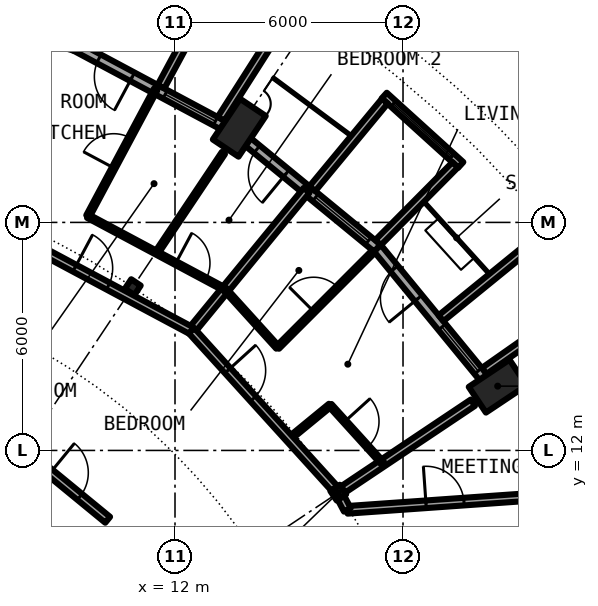
"""IFC4 building model, lengths in metres.
Left out: names, types, materials, properties, quantities, classifications, styles, units other than length and angle.
Written with IfcOpenShell. Run it as: python <this file> out.ifc"""

import sys

from ifc_helpers import new_model, si_unit, direction, frame, frame_2d, origin, origin_2d, place, context, subcontext, project, spatial, rectangle, circle, hollow_circle, i_section, extrude, element, fill, save


model = new_model("IFC4")
c1 = context("Model", 3, precision=1e-05, world=origin(), true_north=direction((0.0, 1.0)))
c2 = subcontext(c1, "Body", "Model", "MODEL_VIEW")
j1 = project(units=[si_unit("LENGTHUNIT", "METRE"), si_unit("PLANEANGLEUNIT", "RADIAN")], contexts=[c1])
p1 = place(None, origin())
s1 = spatial("IfcSite", under=j1, at=p1, CompositionType="ELEMENT")
p2 = place(p1, origin())
s2 = spatial("IfcBuilding", under=s1, at=p2, CompositionType="ELEMENT")
p3 = place(p2, frame((0.0, 0.0, 243.2)))
s3 = spatial("IfcBuildingStorey", under=s2, at=p3, CompositionType="ELEMENT", Elevation=243.2)
for number, where, z_axis, x_axis in (
    (1, (21.027, 14.05, 0.242), (-0.347, -0.232, 0.909), (0.556, -0.831, 0.0)),
    (2, (14.05, 21.027, 0.242), (-0.232, -0.347, 0.909), (0.831, -0.556, 0.0)),
):
    element("IfcColumn", number, at=place(p3, frame(where, z_axis=z_axis, x_axis=x_axis)), inside=s3, PredefinedType="COLUMN", context=c2, shape_type="SweptSolid", body=[
        extrude(hollow_circle(Radius=0.406, WallThickness=0.03, at=origin_2d()), origin(), (0.0, 0.0, 1.0), 3.09),
    ])
for number, where, z_axis, x_axis in (
    (3, (16.297, 10.889, 0.0), (0.0, 0.0, 1.0), (0.831, 0.556, 0.0)),
    (4, (10.889, 16.297, 0.0), (0.0, 0.0, 1.0), (0.556, 0.831, 0.0)),
):
    element("IfcColumn", number, at=place(p3, frame(where, z_axis=z_axis, x_axis=x_axis)), inside=s3, PredefinedType="COLUMN", context=c2, shape_type="SweptSolid", body=[
        extrude(i_section(OverallWidth=0.3, OverallDepth=0.3, WebThickness=0.011, FlangeThickness=0.019, FilletRadius=0.027, at=origin_2d()), origin(), (0.0, 0.0, 1.0), 3.05),
    ])
p4 = place(p3, frame((20.371, 13.611, 0.0), z_axis=(0.0, 0.0, 1.0), x_axis=(-0.634396836208, 0.773007538262, 0.0)))
e5 = element("IfcWall", 5, at=p4, inside=s3, PredefinedType="SOLIDWALL", context=c2, shape_type="SweptSolid", body=[
    extrude(rectangle(XDim=4.803, YDim=0.25, at=frame_2d((2.402, 0.0))), origin(), (0.0, 0.0, 1.0), 2.7),
])
p5 = place(p4, frame((0.62, 0.0, 0.3)))
e6 = element("IfcOpeningElement", 6, at=p5, cuts=e5, PredefinedType="OPENING", context=c2, shape_type="SweptSolid", body=[
    extrude(rectangle(XDim=1.5, YDim=2.1, at=frame_2d((0.75, 1.05))), frame((0.0, 0.135, 0.0), z_axis=(0.0, -1.0, 0.0), x_axis=(1.0, 0.0, 0.0)), (0.0, 0.0, 1.0), 0.27),
])
p6 = place(p4, frame((3.099, 0.0, 0.0)))
e7 = element("IfcOpeningElement", 7, at=p6, cuts=e5, PredefinedType="OPENING", context=c2, shape_type="SweptSolid", body=[
    extrude(rectangle(XDim=1.0, YDim=2.2, at=frame_2d((0.5, 1.1))), frame((0.0, 0.135, 0.0), z_axis=(0.0, -1.0, 0.0), x_axis=(1.0, 0.0, 0.0)), (0.0, 0.0, 1.0), 0.27),
])
p7 = place(p3, frame((20.138, 14.093, -0.03), z_axis=(0.0, 0.0, 1.0), x_axis=(0.81913764619, 0.573596998419, 0.0)))
e8 = element("IfcWall", 8, at=p7, inside=s3, PredefinedType="SOLIDWALL", context=c2, shape_type="SweptSolid", body=[
    extrude(rectangle(XDim=2.92, YDim=0.2, at=frame_2d((1.46, 0.0))), origin(), (0.0, 0.0, 1.0), 2.73),
])
p8 = place(p3, frame((19.0, 15.479, -0.03), z_axis=(0.0, 0.0, 1.0), x_axis=(0.775612161439, 0.631209771017, 0.0)))
e9 = element("IfcWall", 9, at=p8, inside=s3, PredefinedType="SOLIDWALL", context=c2, shape_type="SweptSolid", body=[
    extrude(rectangle(XDim=2.992, YDim=0.2, at=frame_2d((1.496, 0.0))), origin(), (0.0, 0.0, 1.0), 2.73),
])
p9 = place(p3, frame((17.324, 17.324, 0.0), z_axis=(0.0, 0.0, 1.0), x_axis=(-0.773007538262, 0.634396836208, 0.0)))
e10 = element("IfcWall", 10, at=p9, inside=s3, PredefinedType="SOLIDWALL", context=c2, shape_type="SweptSolid", body=[
    extrude(rectangle(XDim=4.803, YDim=0.25, at=frame_2d((2.402, 0.0))), origin(), (0.0, 0.0, 1.0), 2.7),
])
p10 = place(p9, frame((0.304, 0.0, 0.3)))
e11 = element("IfcOpeningElement", 11, at=p10, cuts=e10, PredefinedType="OPENING", context=c2, shape_type="SweptSolid", body=[
    extrude(rectangle(XDim=1.8, YDim=2.1, at=frame_2d((0.9, 1.05))), frame((0.0, 0.135, 0.0), z_axis=(0.0, -1.0, 0.0), x_axis=(1.0, 0.0, 0.0)), (0.0, 0.0, 1.0), 0.27),
])
p11 = place(p9, frame((3.099, 0.0, 0.0)))
e12 = element("IfcOpeningElement", 12, at=p11, cuts=e10, PredefinedType="OPENING", context=c2, shape_type="SweptSolid", body=[
    extrude(rectangle(XDim=1.0, YDim=2.2, at=frame_2d((0.5, 1.1))), frame((0.0, 0.135, 0.0), z_axis=(0.0, -1.0, 0.0), x_axis=(1.0, 0.0, 0.0)), (0.0, 0.0, 1.0), 0.27),
])
p12 = place(p3, frame((19.52, 19.513, -0.03), z_axis=(0.0, 0.0, 1.0), x_axis=(-0.741016284298, 0.671487056022, 0.0)))
e13 = element("IfcWall", 13, at=p12, inside=s3, PredefinedType="SOLIDWALL", context=c2, shape_type="SweptSolid", body=[
    extrude(rectangle(XDim=2.718, YDim=0.2, at=frame_2d((1.359, 0.0))), origin(), (0.0, 0.0, 1.0), 2.73),
])
p13 = place(p12, frame((0.319, 0.0, 0.33)))
e14 = element("IfcOpeningElement", 14, at=p13, cuts=e13, PredefinedType="OPENING", context=c2, shape_type="SweptSolid", body=[
    extrude(circle(Radius=1.04, at=frame_2d((1.04, 1.04))), frame((0.0, 0.11, 0.0), z_axis=(0.0, -1.0, 0.0), x_axis=(1.0, 0.0, 0.0)), (0.0, 0.0, 1.0), 0.22),
])
p14 = place(p3, frame((17.344, 17.47, -0.03), z_axis=(0.0, 0.0, 1.0), x_axis=(0.704306055012, 0.709896457854, 0.0)))
e15 = element("IfcWall", 15, at=p14, inside=s3, PredefinedType="SOLIDWALL", context=c2, shape_type="SweptSolid", body=[
    extrude(rectangle(XDim=2.882, YDim=0.2, at=frame_2d((1.441, 0.0))), origin(), (0.0, 0.0, 1.0), 2.73),
])
p15 = place(p3, frame((15.615, 18.888, -0.03), z_axis=(0.0, 0.0, 1.0), x_axis=(0.637452521862, 0.770489638069, 0.0)))
e16 = element("IfcWall", 16, at=p15, inside=s3, PredefinedType="SOLIDWALL", context=c2, shape_type="SweptSolid", body=[
    extrude(rectangle(XDim=2.993, YDim=0.2, at=frame_2d((1.497, 0.0))), origin(), (0.0, 0.0, 1.0), 2.73),
])
p16 = place(p3, frame((13.611, 20.371, 0.0), z_axis=(0.0, 0.0, 1.0), x_axis=(-0.881903608701, 0.471429766731, 0.0)))
e17 = element("IfcWall", 17, at=p16, inside=s3, PredefinedType="SOLIDWALL", context=c2, shape_type="SweptSolid", body=[
    extrude(rectangle(XDim=4.802, YDim=0.25, at=frame_2d((2.401, 0.0))), origin(), (0.0, 0.0, 1.0), 2.7),
])
p17 = place(p16, frame((0.62, 0.0, 0.3)))
e18 = element("IfcOpeningElement", 18, at=p17, cuts=e17, PredefinedType="OPENING", context=c2, shape_type="SweptSolid", body=[
    extrude(rectangle(XDim=1.5, YDim=2.1, at=frame_2d((0.75, 1.05))), frame((0.0, 0.135, 0.0), z_axis=(0.0, -1.0, 0.0), x_axis=(1.0, 0.0, 0.0)), (0.0, 0.0, 1.0), 0.27),
])
p18 = place(p16, frame((3.099, 0.0, 0.0)))
e19 = element("IfcOpeningElement", 19, at=p18, cuts=e17, PredefinedType="OPENING", context=c2, shape_type="SweptSolid", body=[
    extrude(rectangle(XDim=1.0, YDim=2.2, at=frame_2d((0.5, 1.1))), frame((0.0, 0.135, 0.0), z_axis=(0.0, -1.0, 0.0), x_axis=(1.0, 0.0, 0.0)), (0.0, 0.0, 1.0), 0.27),
])
p19 = place(p3, frame((13.211, 20.727, -0.03), z_axis=(0.0, 0.0, 1.0), x_axis=(0.537551395407, 0.843230986917, 0.0)))
e20 = element("IfcWall", 20, at=p19, inside=s3, PredefinedType="SOLIDWALL", context=c2, shape_type="SweptSolid", body=[
    extrude(rectangle(XDim=2.921, YDim=0.2, at=frame_2d((1.46, 0.0))), origin(), (0.0, 0.0, 1.0), 2.73),
])
p20 = place(p3, frame((11.631, 21.572, -0.03), z_axis=(0.0, 0.0, 1.0), x_axis=(0.474649669009, 0.880174807473, 0.0)))
e21 = element("IfcWall", 21, at=p20, inside=s3, PredefinedType="SOLIDWALL", context=c2, shape_type="SweptSolid", body=[
    extrude(rectangle(XDim=2.991, YDim=0.2, at=frame_2d((1.496, 0.0))), origin(), (0.0, 0.0, 1.0), 2.73),
])
p21 = place(p3, frame((9.709, 18.165, 0.0), z_axis=(0.0, 0.0, 1.0), x_axis=(0.471396335579, 0.881921478819, 0.0)))
e22 = element("IfcWall", 22, at=p21, inside=s3, PredefinedType="PARTITIONING", context=c2, shape_type="SweptSolid", body=[
    extrude(rectangle(XDim=3.778, YDim=0.1, at=frame_2d((1.889, 0.0))), origin(), (0.0, 0.0, 1.0), 2.7),
])
p22 = place(p21, frame((1.439, 0.0, 0.0)))
e23 = element("IfcOpeningElement", 23, at=p22, cuts=e22, PredefinedType="OPENING", context=c2, shape_type="SweptSolid", body=[
    extrude(rectangle(XDim=0.9, YDim=2.3, at=frame_2d((0.45, 1.15))), frame((0.0, 0.06, 0.0), z_axis=(0.0, -1.0, 0.0), x_axis=(1.0, 0.0, 0.0)), (0.0, 0.0, 1.0), 0.12),
])
p23 = place(p3, frame((11.516, 17.199, 0.0), z_axis=(0.0, 0.0, 1.0), x_axis=(0.556125344044, 0.831098430821, 0.0)))
e24 = element("IfcWall", 24, at=p23, inside=s3, PredefinedType="PARTITIONING", context=c2, shape_type="SweptSolid", body=[
    extrude(rectangle(XDim=3.161, YDim=0.1, at=frame_2d((1.581, 0.0))), origin(), (0.0, 0.0, 1.0), 2.7),
])
p24 = place(p3, frame((12.433, 15.152, 0.0), z_axis=(0.0, 0.0, 1.0), x_axis=(0.634362058107, 0.77303607887, 0.0)))
e25 = element("IfcWall", 25, at=p24, inside=s3, PredefinedType="PARTITIONING", context=c2, shape_type="SweptSolid", body=[
    extrude(rectangle(XDim=4.775, YDim=0.2, at=frame_2d((2.387, 0.0))), origin(), (0.0, 0.0, 1.0), 2.7),
])
p25 = place(p3, frame((14.702, 14.711, 0.0), z_axis=(0.0, 0.0, 1.0), x_axis=(0.706833687935, 0.707379769007, 0.0)))
e26 = element("IfcWall", 26, at=p25, inside=s3, PredefinedType="PARTITIONING", context=c2, shape_type="SweptSolid", body=[
    extrude(rectangle(XDim=3.577, YDim=0.1, at=frame_2d((1.788, 0.0))), origin(), (0.0, 0.0, 1.0), 2.7),
])
p26 = place(p25, frame((1.338, 0.0, 0.0)))
e27 = element("IfcOpeningElement", 27, at=p26, cuts=e26, PredefinedType="OPENING", context=c2, shape_type="SweptSolid", body=[
    extrude(rectangle(XDim=0.9, YDim=2.3, at=frame_2d((0.45, 1.15))), frame((0.0, 0.06, 0.0), z_axis=(0.0, -1.0, 0.0), x_axis=(1.0, 0.0, 0.0)), (0.0, 0.0, 1.0), 0.12),
])
p27 = place(p3, frame((15.009, 12.31, 0.0), z_axis=(0.0, 0.0, 1.0), x_axis=(0.773321325714, 0.634014295735, 0.0)))
e28 = element("IfcWall", 28, at=p27, inside=s3, PredefinedType="PARTITIONING", context=c2, shape_type="SweptSolid", body=[
    extrude(rectangle(XDim=1.386, YDim=0.1, at=frame_2d((0.693, 0.0))), origin(), (0.0, 0.0, 1.0), 2.7),
])
p28 = place(p3, frame((16.422, 10.972, 0.0), z_axis=(0.0, 0.0, 1.0), x_axis=(0.831263363926, 0.555878781566, 0.0)))
e29 = element("IfcWall", 29, at=p28, inside=s3, PredefinedType="PARTITIONING", context=c2, shape_type="SweptSolid", body=[
    extrude(rectangle(XDim=4.109, YDim=0.2, at=frame_2d((2.055, 0.0))), origin(), (0.0, 0.0, 1.0), 2.7),
])
p29 = place(p3, frame((16.535, 10.437, 0.0), z_axis=(0.0, 0.0, 1.0), x_axis=(0.997515141784, 0.070452408845, 0.0)))
e30 = element("IfcWall", 30, at=p29, inside=s3, PredefinedType="PARTITIONING", context=c2, shape_type="SweptSolid", body=[
    extrude(rectangle(XDim=5.153, YDim=0.2, at=frame_2d((2.576, 0.0))), origin(), (0.0, 0.0, 1.0), 2.7),
])
p30 = place(p29, frame((2.076, 0.0, 0.0)))
e31 = element("IfcOpeningElement", 31, at=p30, cuts=e30, PredefinedType="OPENING", context=c2, shape_type="SweptSolid", body=[
    extrude(rectangle(XDim=1.0, YDim=2.3, at=frame_2d((0.5, 1.15))), frame((0.0, 0.11, 0.0), z_axis=(0.0, -1.0, 0.0), x_axis=(1.0, 0.0, 0.0)), (0.0, 0.0, 1.0), 0.22),
])
p31 = place(p3, frame((5.742, 13.857, 0.0), z_axis=(0.0, 0.0, 1.0), x_axis=(0.772989261861, -0.634419105204, 0.0)))
e32 = element("IfcWall", 32, at=p31, inside=s3, PredefinedType="PARTITIONING", context=c2, shape_type="SweptSolid", body=[
    extrude(rectangle(XDim=5.803, YDim=0.2, at=frame_2d((2.902, 0.0))), origin(), (0.0, 0.0, 1.0), 2.7),
])
p32 = place(p31, frame((3.851, 0.0, 0.0)))
e33 = element("IfcOpeningElement", 33, at=p32, cuts=e32, PredefinedType="OPENING", context=c2, shape_type="SweptSolid", body=[
    extrude(rectangle(XDim=1.0, YDim=2.3, at=frame_2d((0.5, 1.15))), frame((0.0, 0.11, 0.0), z_axis=(0.0, -1.0, 0.0), x_axis=(1.0, 0.0, 0.0)), (0.0, 0.0, 1.0), 0.22),
])
p33 = place(p3, frame((5.69, 18.756, 0.0), z_axis=(0.0, 0.0, 1.0), x_axis=(0.881899173092, -0.47143806433, 0.0)))
e34 = element("IfcWall", 34, at=p33, inside=s3, PredefinedType="PARTITIONING", context=c2, shape_type="SweptSolid", body=[
    extrude(rectangle(XDim=7.647, YDim=0.2, at=frame_2d((3.824, 0.0))), origin(), (0.0, 0.0, 1.0), 2.45),
])
p34 = place(p33, frame((4.161, 0.0, 0.0)))
e35 = element("IfcOpeningElement", 35, at=p34, cuts=e34, PredefinedType="OPENING", context=c2, shape_type="SweptSolid", body=[
    extrude(rectangle(XDim=1.0, YDim=2.3, at=frame_2d((0.5, 1.15))), frame((0.0, 0.11, 0.0), z_axis=(0.0, -1.0, 0.0), x_axis=(1.0, 0.0, 0.0)), (0.0, 0.0, 1.0), 0.22),
])
p35 = place(p3, frame((12.434, 15.151, 0.0), z_axis=(0.0, 0.0, 1.0), x_axis=(0.671619657805, -0.740896102871, 0.0)))
e36 = element("IfcWall", 36, at=p35, inside=s3, PredefinedType="PARTITIONING", context=c2, shape_type="SweptSolid", body=[
    extrude(rectangle(XDim=5.6, YDim=0.2, at=frame_2d((2.8, 0.0))), origin(), (0.0, 0.0, 1.0), 2.45),
])
p36 = place(p35, frame((1.417, 0.0, 0.0)))
e37 = element("IfcOpeningElement", 37, at=p36, cuts=e36, PredefinedType="OPENING", context=c2, shape_type="SweptSolid", body=[
    extrude(rectangle(XDim=1.0, YDim=2.3, at=frame_2d((0.5, 1.15))), frame((0.0, 0.11, 0.0), z_axis=(0.0, -1.0, 0.0), x_axis=(1.0, 0.0, 0.0)), (0.0, 0.0, 1.0), 0.22),
])
p37 = place(p3, frame((16.367, 10.756, 0.0), z_axis=(0.0, 0.0, 1.0), x_axis=(0.465802239822, -0.884888848035, 0.0)))
e38 = element("IfcWall", 38, at=p37, inside=s3, PredefinedType="PARTITIONING", context=c2, shape_type="SweptSolid", body=[
    extrude(rectangle(XDim=0.361, YDim=0.2, at=frame_2d((0.18, 0.0))), origin(), (0.0, 0.0, 1.0), 2.7),
])
p38 = place(p3, frame((9.708, 18.165, 0.0), z_axis=(0.0, 0.0, 1.0), x_axis=(0.881926970029, -0.471386062094, 0.0)))
e39 = element("IfcWall", 39, at=p38, inside=s3, PredefinedType="PARTITIONING", context=c2, shape_type="SweptSolid", body=[
    extrude(rectangle(XDim=4.097, YDim=0.1, at=frame_2d((2.048, 0.0))), origin(), (0.0, 0.0, 1.0), 2.7),
])
p39 = place(p38, frame((2.622, 0.0, 0.0)))
e40 = element("IfcOpeningElement", 40, at=p39, cuts=e39, PredefinedType="OPENING", context=c2, shape_type="SweptSolid", body=[
    extrude(rectangle(XDim=0.9, YDim=2.3, at=frame_2d((0.45, 1.15))), frame((0.0, 0.06, 0.0), z_axis=(0.0, -1.0, 0.0), x_axis=(1.0, 0.0, 0.0)), (0.0, 0.0, 1.0), 0.12),
])
p40 = place(p3, frame((13.321, 16.233, 0.0), z_axis=(0.0, 0.0, 1.0), x_axis=(0.671678456097, -0.74084279818, 0.0)))
e41 = element("IfcWall", 41, at=p40, inside=s3, PredefinedType="PARTITIONING", context=c2, shape_type="SweptSolid", body=[
    extrude(rectangle(XDim=2.054, YDim=0.1, at=frame_2d((1.027, 0.0))), origin(), (0.0, 0.0, 1.0), 2.7),
])
p41 = place(p3, frame((16.081, 13.189, 0.0), z_axis=(0.0, 0.0, 1.0), x_axis=(0.671678456097, -0.74084279818, 0.0)))
e42 = element("IfcWall", 42, at=p41, inside=s3, PredefinedType="PARTITIONING", context=c2, shape_type="SweptSolid", body=[
    extrude(rectangle(XDim=2.054, YDim=0.1, at=frame_2d((1.027, 0.0))), origin(), (0.0, 0.0, 1.0), 2.7),
])
p42 = place(p41, frame((0.577, 0.0, 0.0)))
e43 = element("IfcOpeningElement", 43, at=p42, cuts=e42, PredefinedType="OPENING", context=c2, shape_type="SweptSolid", body=[
    extrude(rectangle(XDim=0.9, YDim=2.3, at=frame_2d((0.45, 1.15))), frame((0.0, 0.06, 0.0), z_axis=(0.0, -1.0, 0.0), x_axis=(1.0, 0.0, 0.0)), (0.0, 0.0, 1.0), 0.12),
])
p43 = place(p5, origin())
e44 = element("IfcWindow", 44, at=p43, inside=s3, PartitioningType="SINGLE_PANEL", PredefinedType="WINDOW", context=c2, shape_type="SweptSolid", body=[
    extrude(rectangle(XDim=1.5, YDim=2.1, at=frame_2d((0.75, 1.05))), frame((0.0, 0.03, 0.0), z_axis=(0.0, -1.0, 0.0), x_axis=(1.0, 0.0, 0.0)), (0.0, 0.0, 1.0), 0.06),
])
fill(e6, e44)
p44 = place(p6, origin())
e45 = element("IfcDoor", 45, at=p44, inside=s3, OperationType="SINGLE_SWING_LEFT", PredefinedType="DOOR", context=c2, shape_type="SweptSolid", body=[
    extrude(rectangle(XDim=1.0, YDim=2.2, at=frame_2d((0.5, 1.1))), frame((0.0, 0.025, 0.0), z_axis=(0.0, -1.0, 0.0), x_axis=(1.0, 0.0, 0.0)), (0.0, 0.0, 1.0), 0.05),
])
fill(e7, e45)
p45 = place(p10, origin())
e46 = element("IfcWindow", 46, at=p45, inside=s3, PartitioningType="SINGLE_PANEL", PredefinedType="WINDOW", context=c2, shape_type="SweptSolid", body=[
    extrude(rectangle(XDim=1.8, YDim=2.1, at=frame_2d((0.9, 1.05))), frame((0.0, 0.03, 0.0), z_axis=(0.0, -1.0, 0.0), x_axis=(1.0, 0.0, 0.0)), (0.0, 0.0, 1.0), 0.06),
])
fill(e11, e46)
p46 = place(p13, origin())
e47 = element("IfcWindow", 47, at=p46, inside=s3, PartitioningType="SINGLE_PANEL", PredefinedType="WINDOW", context=c2, shape_type="SweptSolid", body=[
    extrude(circle(Radius=1.04, at=frame_2d((1.04, 1.04))), frame((0.0, 0.03, 0.0), z_axis=(0.0, -1.0, 0.0), x_axis=(1.0, 0.0, 0.0)), (0.0, 0.0, 1.0), 0.06),
])
fill(e14, e47)
p47 = place(p11, origin())
e48 = element("IfcDoor", 48, at=p47, inside=s3, OperationType="SINGLE_SWING_LEFT", PredefinedType="DOOR", context=c2, shape_type="SweptSolid", body=[
    extrude(rectangle(XDim=1.0, YDim=2.2, at=frame_2d((0.5, 1.1))), frame((0.0, 0.025, 0.0), z_axis=(0.0, -1.0, 0.0), x_axis=(1.0, 0.0, 0.0)), (0.0, 0.0, 1.0), 0.05),
])
fill(e12, e48)
p48 = place(p17, origin())
e49 = element("IfcWindow", 49, at=p48, inside=s3, PartitioningType="SINGLE_PANEL", PredefinedType="WINDOW", context=c2, shape_type="SweptSolid", body=[
    extrude(rectangle(XDim=1.5, YDim=2.1, at=frame_2d((0.75, 1.05))), frame((0.0, 0.03, 0.0), z_axis=(0.0, -1.0, 0.0), x_axis=(1.0, 0.0, 0.0)), (0.0, 0.0, 1.0), 0.06),
])
fill(e18, e49)
p49 = place(p18, origin())
e50 = element("IfcDoor", 50, at=p49, inside=s3, OperationType="SINGLE_SWING_LEFT", PredefinedType="DOOR", context=c2, shape_type="SweptSolid", body=[
    extrude(rectangle(XDim=1.0, YDim=2.2, at=frame_2d((0.5, 1.1))), frame((0.0, 0.025, 0.0), z_axis=(0.0, -1.0, 0.0), x_axis=(1.0, 0.0, 0.0)), (0.0, 0.0, 1.0), 0.05),
])
fill(e19, e50)
p50 = place(p36, origin())
e51 = element("IfcDoor", 51, at=p50, inside=s3, OperationType="SINGLE_SWING_LEFT", PredefinedType="DOOR", context=c2, shape_type="SweptSolid", body=[
    extrude(rectangle(XDim=1.0, YDim=2.3, at=frame_2d((0.5, 1.15))), frame((0.0, 0.025, 0.0), z_axis=(0.0, -1.0, 0.0), x_axis=(1.0, 0.0, 0.0)), (0.0, 0.0, 1.0), 0.05),
])
fill(e37, e51)
p51 = place(p42, origin())
e52 = element("IfcDoor", 52, at=p51, inside=s3, OperationType="SINGLE_SWING_RIGHT", PredefinedType="DOOR", context=c2, shape_type="SweptSolid", body=[
    extrude(rectangle(XDim=0.9, YDim=2.3, at=frame_2d((0.45, 1.15))), frame((0.0, 0.025, 0.0), z_axis=(0.0, -1.0, 0.0), x_axis=(1.0, 0.0, 0.0)), (0.0, 0.0, 1.0), 0.05),
])
fill(e43, e52)
p52 = place(p26, origin())
e53 = element("IfcDoor", 53, at=p52, inside=s3, OperationType="SINGLE_SWING_RIGHT", PredefinedType="DOOR", context=c2, shape_type="SweptSolid", body=[
    extrude(rectangle(XDim=0.9, YDim=2.3, at=frame_2d((0.45, 1.15))), frame((0.0, 0.025, 0.0), z_axis=(0.0, -1.0, 0.0), x_axis=(1.0, 0.0, 0.0)), (0.0, 0.0, 1.0), 0.05),
])
fill(e27, e53)
p53 = place(p34, origin())
e54 = element("IfcDoor", 54, at=p53, inside=s3, OperationType="SINGLE_SWING_RIGHT", PredefinedType="DOOR", context=c2, shape_type="SweptSolid", body=[
    extrude(rectangle(XDim=1.0, YDim=2.3, at=frame_2d((0.5, 1.15))), frame((0.0, 0.025, 0.0), z_axis=(0.0, -1.0, 0.0), x_axis=(1.0, 0.0, 0.0)), (0.0, 0.0, 1.0), 0.05),
])
fill(e35, e54)
p54 = place(p22, origin())
e55 = element("IfcDoor", 55, at=p54, inside=s3, OperationType="SINGLE_SWING_LEFT", PredefinedType="DOOR", context=c2, shape_type="SweptSolid", body=[
    extrude(rectangle(XDim=0.9, YDim=2.3, at=frame_2d((0.45, 1.15))), frame((0.0, 0.025, 0.0), z_axis=(0.0, -1.0, 0.0), x_axis=(1.0, 0.0, 0.0)), (0.0, 0.0, 1.0), 0.05),
])
fill(e23, e55)
p55 = place(p39, origin())
e56 = element("IfcDoor", 56, at=p55, inside=s3, OperationType="SINGLE_SWING_RIGHT", PredefinedType="DOOR", context=c2, shape_type="SweptSolid", body=[
    extrude(rectangle(XDim=0.9, YDim=2.3, at=frame_2d((0.45, 1.15))), frame((0.0, 0.025, 0.0), z_axis=(0.0, -1.0, 0.0), x_axis=(1.0, 0.0, 0.0)), (0.0, 0.0, 1.0), 0.05),
])
fill(e40, e56)
p56 = place(p32, origin())
e57 = element("IfcDoor", 57, at=p56, inside=s3, OperationType="SINGLE_SWING_RIGHT", PredefinedType="DOOR", context=c2, shape_type="SweptSolid", body=[
    extrude(rectangle(XDim=1.0, YDim=2.3, at=frame_2d((0.5, 1.15))), frame((0.0, 0.025, 0.0), z_axis=(0.0, -1.0, 0.0), x_axis=(1.0, 0.0, 0.0)), (0.0, 0.0, 1.0), 0.05),
])
fill(e33, e57)
p57 = place(p30, origin())
e58 = element("IfcDoor", 58, at=p57, inside=s3, OperationType="SINGLE_SWING_LEFT", PredefinedType="DOOR", context=c2, shape_type="SweptSolid", body=[
    extrude(rectangle(XDim=1.0, YDim=2.3, at=frame_2d((0.5, 1.15))), frame((0.0, 0.025, 0.0), z_axis=(0.0, -1.0, 0.0), x_axis=(1.0, 0.0, 0.0)), (0.0, 0.0, 1.0), 0.05),
])
fill(e31, e58)
save(model, sys.argv[1])
